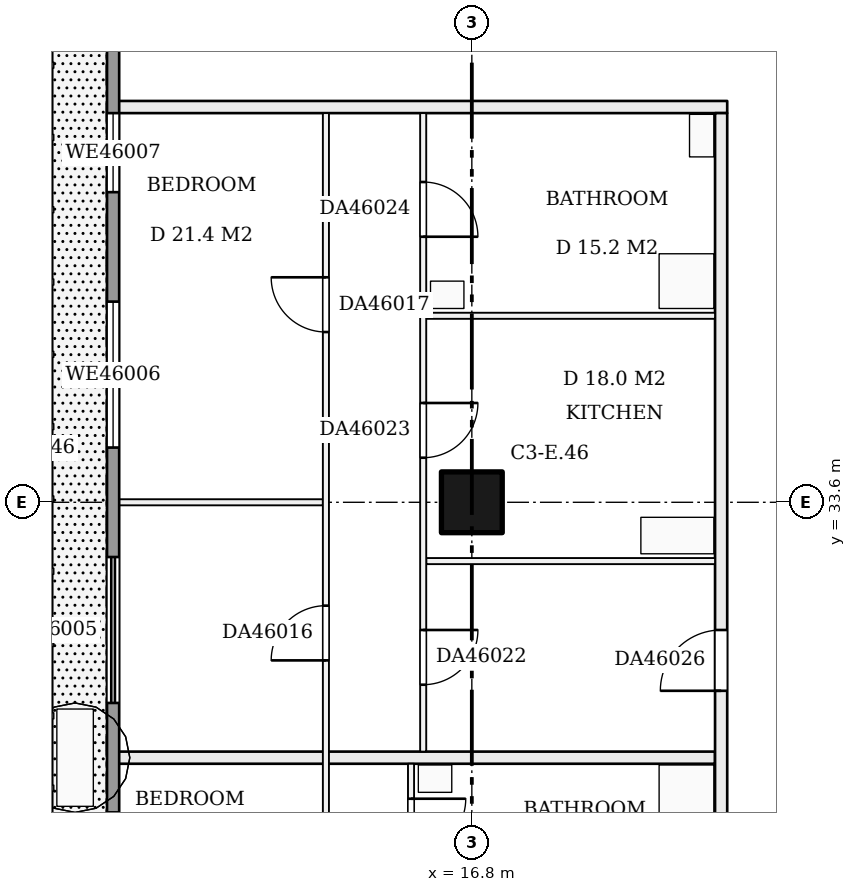
"""IFC4 building model, lengths in metres.
Left out: names, types, materials, properties, quantities, classifications, styles, units other than length and angle.
Written with IfcOpenShell. Run it as: python <this file> out.ifc"""

import sys

from ifc_helpers import new_model, si_unit, direction, frame, frame_2d, origin, origin_2d, place, context, subcontext, project, spatial, rectangle, extrude, element, fill, save


model = new_model("IFC4")
c1 = context("Model", 3, precision=1e-05, world=origin(), true_north=direction((0.0, 1.0)))
c2 = subcontext(c1, "Body", "Model", "MODEL_VIEW")
j1 = project(units=[si_unit("LENGTHUNIT", "METRE"), si_unit("PLANEANGLEUNIT", "RADIAN")], contexts=[c1])
p1 = place(None, origin())
s1 = spatial("IfcSite", under=j1, at=p1, CompositionType="ELEMENT")
p2 = place(p1, origin())
s2 = spatial("IfcBuilding", under=s1, at=p2, CompositionType="ELEMENT")
p3 = place(p2, frame((0.0, 0.0, 179.2)))
s3 = spatial("IfcBuildingStorey", under=s2, at=p3, CompositionType="ELEMENT", Elevation=179.2)
p4 = place(p3, frame((16.8, 33.6, 0.0), z_axis=(0.0, 0.0, 1.0), x_axis=(1.0, 0.0, 0.0)))
e1 = element("IfcColumn", 1, at=p4, inside=s3, PredefinedType="COLUMN", context=c2, shape_type="SweptSolid", body=[
    extrude(rectangle(XDim=1.0, YDim=1.0, at=origin_2d()), origin(), (0.0, 0.0, 1.0), 3.22),
])
p5 = place(p3, frame((10.9, 29.4, 0.0), z_axis=(0.0, 0.0, 1.0), x_axis=(1.0, 0.0, 0.0)))
e2 = element("IfcWall", 2, at=p5, inside=s3, PredefinedType="PARTITIONING", context=c2, shape_type="SweptSolid", body=[
    extrude(rectangle(XDim=9.9, YDim=0.2, at=frame_2d((4.95, 0.0))), origin(), (0.0, 0.0, 1.0), 3.22),
])
p6 = place(p3, frame((16.05, 32.633, 0.0), z_axis=(0.0, 0.0, 1.0), x_axis=(1.0, 0.0, 0.0)))
e3 = element("IfcWall", 3, at=p6, inside=s3, PredefinedType="PARTITIONING", context=c2, shape_type="SweptSolid", body=[
    extrude(rectangle(XDim=4.75, YDim=0.1, at=frame_2d((2.375, 0.0))), origin(), (0.0, 0.0, 1.0), 3.22),
])
p7 = place(p3, frame((10.9, 33.6, 0.0), z_axis=(0.0, 0.0, 1.0), x_axis=(1.0, 0.0, 0.0)))
e4 = element("IfcWall", 4, at=p7, inside=s3, PredefinedType="PARTITIONING", context=c2, shape_type="SweptSolid", body=[
    extrude(rectangle(XDim=3.45, YDim=0.1, at=frame_2d((1.725, 0.0))), origin(), (0.0, 0.0, 1.0), 3.22),
])
p8 = place(p3, frame((16.05, 36.667, 0.0), z_axis=(0.0, 0.0, 1.0), x_axis=(1.0, 0.0, 0.0)))
e5 = element("IfcWall", 5, at=p8, inside=s3, PredefinedType="PARTITIONING", context=c2, shape_type="SweptSolid", body=[
    extrude(rectangle(XDim=4.75, YDim=0.1, at=frame_2d((2.375, 0.0))), origin(), (0.0, 0.0, 1.0), 3.22),
])
p9 = place(p3, frame((10.9, 40.1, 0.0), z_axis=(0.0, 0.0, 1.0), x_axis=(1.0, 0.0, 0.0)))
e6 = element("IfcWall", 6, at=p9, inside=s3, PredefinedType="PARTITIONING", context=c2, shape_type="SweptSolid", body=[
    extrude(rectangle(XDim=10.1, YDim=0.2, at=frame_2d((5.05, 0.0))), origin(), (0.0, 0.0, 1.0), 3.22),
])
p10 = place(p3, frame((14.4, 21.0, 0.0), z_axis=(0.0, 0.0, 1.0), x_axis=(0.0, 1.0, 0.0)))
e7 = element("IfcWall", 7, at=p10, inside=s3, PredefinedType="PARTITIONING", context=c2, shape_type="SweptSolid", body=[
    extrude(rectangle(XDim=19.0, YDim=0.1, at=frame_2d((9.5, 0.0))), origin(), (0.0, 0.0, 1.0), 3.22),
])
p11 = place(p10, frame((1.6, 0.0, 0.0)))
e8 = element("IfcOpeningElement", 8, at=p11, cuts=e7, PredefinedType="OPENING", context=c2, shape_type="SweptSolid", body=[
    extrude(rectangle(XDim=0.9, YDim=2.1, at=frame_2d((0.45, 1.05))), frame((0.0, 0.06, 0.0), z_axis=(0.0, -1.0, 0.0), x_axis=(1.0, 0.0, 0.0)), (0.0, 0.0, 1.0), 0.12),
])
p12 = place(p10, frame((5.8, 0.0, 0.0)))
e9 = element("IfcOpeningElement", 9, at=p12, cuts=e7, PredefinedType="OPENING", context=c2, shape_type="SweptSolid", body=[
    extrude(rectangle(XDim=0.9, YDim=2.1, at=frame_2d((0.45, 1.05))), frame((0.0, 0.06, 0.0), z_axis=(0.0, -1.0, 0.0), x_axis=(1.0, 0.0, 0.0)), (0.0, 0.0, 1.0), 0.12),
])
p13 = place(p10, frame((10.0, 0.0, 0.0)))
e10 = element("IfcOpeningElement", 10, at=p13, cuts=e7, PredefinedType="OPENING", context=c2, shape_type="SweptSolid", body=[
    extrude(rectangle(XDim=0.9, YDim=2.1, at=frame_2d((0.45, 1.05))), frame((0.0, 0.06, 0.0), z_axis=(0.0, -1.0, 0.0), x_axis=(1.0, 0.0, 0.0)), (0.0, 0.0, 1.0), 0.12),
])
p14 = place(p10, frame((15.4, 0.0, 0.0)))
e11 = element("IfcOpeningElement", 11, at=p14, cuts=e7, PredefinedType="OPENING", context=c2, shape_type="SweptSolid", body=[
    extrude(rectangle(XDim=0.9, YDim=2.1, at=frame_2d((0.45, 1.05))), frame((0.0, 0.06, 0.0), z_axis=(0.0, -1.0, 0.0), x_axis=(1.0, 0.0, 0.0)), (0.0, 0.0, 1.0), 0.12),
])
p15 = place(p3, frame((15.8, 21.0, 0.0), z_axis=(0.0, 0.0, 1.0), x_axis=(0.0, 1.0, 0.0)))
e12 = element("IfcWall", 12, at=p15, inside=s3, PredefinedType="PARTITIONING", context=c2, shape_type="SweptSolid", body=[
    extrude(rectangle(XDim=8.3, YDim=0.1, at=frame_2d((4.15, 0.0))), origin(), (0.0, 0.0, 1.0), 3.22),
])
p16 = place(p15, frame((2.2, 0.0, 0.0)))
e13 = element("IfcOpeningElement", 13, at=p16, cuts=e12, PredefinedType="OPENING", context=c2, shape_type="SweptSolid", body=[
    extrude(rectangle(XDim=0.9, YDim=2.1, at=frame_2d((0.45, 1.05))), frame((0.0, 0.06, 0.0), z_axis=(0.0, -1.0, 0.0), x_axis=(1.0, 0.0, 0.0)), (0.0, 0.0, 1.0), 0.12),
])
p17 = place(p15, frame((0.3, 0.0, 0.0)))
e14 = element("IfcOpeningElement", 14, at=p17, cuts=e12, PredefinedType="OPENING", context=c2, shape_type="SweptSolid", body=[
    extrude(rectangle(XDim=0.9, YDim=2.1, at=frame_2d((0.45, 1.05))), frame((0.0, 0.06, 0.0), z_axis=(0.0, -1.0, 0.0), x_axis=(1.0, 0.0, 0.0)), (0.0, 0.0, 1.0), 0.12),
])
p18 = place(p15, frame((4.863, 0.0, 0.0)))
e15 = element("IfcOpeningElement", 15, at=p18, cuts=e12, PredefinedType="OPENING", context=c2, shape_type="SweptSolid", body=[
    extrude(rectangle(XDim=0.9, YDim=2.1, at=frame_2d((0.45, 1.05))), frame((0.0, 0.06, 0.0), z_axis=(0.0, -1.0, 0.0), x_axis=(1.0, 0.0, 0.0)), (0.0, 0.0, 1.0), 0.12),
])
p19 = place(p15, frame((6.825, 0.0, 0.0)))
e16 = element("IfcOpeningElement", 16, at=p19, cuts=e12, PredefinedType="OPENING", context=c2, shape_type="SweptSolid", body=[
    extrude(rectangle(XDim=0.9, YDim=2.1, at=frame_2d((0.45, 1.05))), frame((0.0, 0.06, 0.0), z_axis=(0.0, -1.0, 0.0), x_axis=(1.0, 0.0, 0.0)), (0.0, 0.0, 1.0), 0.12),
])
p20 = place(p3, frame((16.0, 29.5, 0.0), z_axis=(0.0, 0.0, 1.0), x_axis=(0.0, 1.0, 0.0)))
e17 = element("IfcWall", 17, at=p20, inside=s3, PredefinedType="PARTITIONING", context=c2, shape_type="SweptSolid", body=[
    extrude(rectangle(XDim=10.5, YDim=0.1, at=frame_2d((5.25, 0.0))), origin(), (0.0, 0.0, 1.0), 3.22),
])
p21 = place(p20, frame((1.1, 0.0, 0.0)))
e18 = element("IfcOpeningElement", 18, at=p21, cuts=e17, PredefinedType="OPENING", context=c2, shape_type="SweptSolid", body=[
    extrude(rectangle(XDim=0.9, YDim=2.1, at=frame_2d((0.45, 1.05))), frame((0.0, 0.06, 0.0), z_axis=(0.0, -1.0, 0.0), x_axis=(1.0, 0.0, 0.0)), (0.0, 0.0, 1.0), 0.12),
])
p22 = place(p20, frame((4.833, 0.0, 0.0)))
e19 = element("IfcOpeningElement", 19, at=p22, cuts=e17, PredefinedType="OPENING", context=c2, shape_type="SweptSolid", body=[
    extrude(rectangle(XDim=0.9, YDim=2.1, at=frame_2d((0.45, 1.05))), frame((0.0, 0.06, 0.0), z_axis=(0.0, -1.0, 0.0), x_axis=(1.0, 0.0, 0.0)), (0.0, 0.0, 1.0), 0.12),
])
p23 = place(p20, frame((8.467, 0.0, 0.0)))
e20 = element("IfcOpeningElement", 20, at=p23, cuts=e17, PredefinedType="OPENING", context=c2, shape_type="SweptSolid", body=[
    extrude(rectangle(XDim=0.9, YDim=2.1, at=frame_2d((0.45, 1.05))), frame((0.0, 0.06, 0.0), z_axis=(0.0, -1.0, 0.0), x_axis=(1.0, 0.0, 0.0)), (0.0, 0.0, 1.0), 0.12),
])
p24 = place(p3, frame((20.9, 22.8, 0.0), z_axis=(0.0, 0.0, 1.0), x_axis=(0.0, 1.0, 0.0)))
e21 = element("IfcWall", 21, at=p24, inside=s3, PredefinedType="PARTITIONING", context=c2, shape_type="SweptSolid", body=[
    extrude(rectangle(XDim=17.2, YDim=0.2, at=frame_2d((8.6, 0.0))), origin(), (0.0, 0.0, 1.0), 3.22),
])
p25 = place(p24, frame((0.3, 0.0, 0.0)))
e22 = element("IfcOpeningElement", 22, at=p25, cuts=e21, PredefinedType="OPENING", context=c2, shape_type="SweptSolid", body=[
    extrude(rectangle(XDim=1.0, YDim=2.1, at=frame_2d((0.5, 1.05))), frame((0.0, 0.11, 0.0), z_axis=(0.0, -1.0, 0.0), x_axis=(1.0, 0.0, 0.0)), (0.0, 0.0, 1.0), 0.22),
])
p26 = place(p24, frame((7.7, 0.0, 0.0)))
e23 = element("IfcOpeningElement", 23, at=p26, cuts=e21, PredefinedType="OPENING", context=c2, shape_type="SweptSolid", body=[
    extrude(rectangle(XDim=1.0, YDim=2.1, at=frame_2d((0.5, 1.05))), frame((0.0, 0.11, 0.0), z_axis=(0.0, -1.0, 0.0), x_axis=(1.0, 0.0, 0.0)), (0.0, 0.0, 1.0), 0.22),
])
p27 = place(p3, frame((10.9, 42.0, 0.0), z_axis=(0.0, 0.0, 1.0), x_axis=(0.0, -1.0, 0.0)))
e24 = element("IfcWall", 24, at=p27, inside=s3, PredefinedType="SOLIDWALL", context=c2, shape_type="SweptSolid", body=[
    extrude(rectangle(XDim=28.6, YDim=0.2, at=frame_2d((14.3, 0.0))), origin(), (0.0, 0.0, 1.0), 3.22),
])
p28 = place(p27, frame((25.9, 0.0, 0.0)))
e25 = element("IfcOpeningElement", 25, at=p28, cuts=e24, PredefinedType="OPENING", context=c2, shape_type="SweptSolid", body=[
    extrude(rectangle(XDim=2.4, YDim=2.2, at=frame_2d((1.2, 1.1))), frame((0.0, 0.11, 0.0), z_axis=(0.0, -1.0, 0.0), x_axis=(1.0, 0.0, 0.0)), (0.0, 0.0, 1.0), 0.22),
])
p29 = place(p27, frame((21.9, 0.0, 0.0)))
e26 = element("IfcOpeningElement", 26, at=p29, cuts=e24, PredefinedType="OPENING", context=c2, shape_type="SweptSolid", body=[
    extrude(rectangle(XDim=2.4, YDim=2.2, at=frame_2d((1.2, 1.1))), frame((0.0, 0.11, 0.0), z_axis=(0.0, -1.0, 0.0), x_axis=(1.0, 0.0, 0.0)), (0.0, 0.0, 1.0), 0.22),
])
p30 = place(p27, frame((17.7, 0.0, 0.0)))
e27 = element("IfcOpeningElement", 27, at=p30, cuts=e24, PredefinedType="OPENING", context=c2, shape_type="SweptSolid", body=[
    extrude(rectangle(XDim=2.4, YDim=2.2, at=frame_2d((1.2, 1.1))), frame((0.0, 0.11, 0.0), z_axis=(0.0, -1.0, 0.0), x_axis=(1.0, 0.0, 0.0)), (0.0, 0.0, 1.0), 0.22),
])
p31 = place(p27, frame((13.5, 0.0, 0.9)))
e28 = element("IfcOpeningElement", 28, at=p31, cuts=e24, PredefinedType="OPENING", context=c2, shape_type="SweptSolid", body=[
    extrude(rectangle(XDim=2.4, YDim=1.5, at=frame_2d((1.2, 0.75))), frame((0.0, 0.11, 0.0), z_axis=(0.0, -1.0, 0.0), x_axis=(1.0, 0.0, 0.0)), (0.0, 0.0, 1.0), 0.22),
])
p32 = place(p27, frame((9.3, 0.0, 0.0)))
e29 = element("IfcOpeningElement", 29, at=p32, cuts=e24, PredefinedType="OPENING", context=c2, shape_type="SweptSolid", body=[
    extrude(rectangle(XDim=2.4, YDim=2.2, at=frame_2d((1.2, 1.1))), frame((0.0, 0.11, 0.0), z_axis=(0.0, -1.0, 0.0), x_axis=(1.0, 0.0, 0.0)), (0.0, 0.0, 1.0), 0.22),
])
p33 = place(p27, frame((5.1, 0.0, 0.9)))
e30 = element("IfcOpeningElement", 30, at=p33, cuts=e24, PredefinedType="OPENING", context=c2, shape_type="SweptSolid", body=[
    extrude(rectangle(XDim=2.4, YDim=1.5, at=frame_2d((1.2, 0.75))), frame((0.0, 0.11, 0.0), z_axis=(0.0, -1.0, 0.0), x_axis=(1.0, 0.0, 0.0)), (0.0, 0.0, 1.0), 0.22),
])
p34 = place(p27, frame((2.0, 0.0, 0.9)))
e31 = element("IfcOpeningElement", 31, at=p34, cuts=e24, PredefinedType="OPENING", context=c2, shape_type="SweptSolid", body=[
    extrude(rectangle(XDim=1.3, YDim=1.5, at=frame_2d((0.65, 0.75))), frame((0.0, 0.11, 0.0), z_axis=(0.0, -1.0, 0.0), x_axis=(1.0, 0.0, 0.0)), (0.0, 0.0, 1.0), 0.22),
])
p35 = place(p13, origin())
e32 = element("IfcDoor", 32, at=p35, inside=s3, OperationType="SINGLE_SWING_LEFT", PredefinedType="DOOR", context=c2, shape_type="SweptSolid", body=[
    extrude(rectangle(XDim=0.9, YDim=2.1, at=frame_2d((0.45, 1.05))), frame((0.0, 0.025, 0.0), z_axis=(0.0, -1.0, 0.0), x_axis=(1.0, 0.0, 0.0)), (0.0, 0.0, 1.0), 0.05),
])
fill(e10, e32)
p36 = place(p14, origin())
e33 = element("IfcDoor", 33, at=p36, inside=s3, OperationType="SINGLE_SWING_RIGHT", PredefinedType="DOOR", context=c2, shape_type="SweptSolid", body=[
    extrude(rectangle(XDim=0.9, YDim=2.1, at=frame_2d((0.45, 1.05))), frame((0.0, 0.025, 0.0), z_axis=(0.0, -1.0, 0.0), x_axis=(1.0, 0.0, 0.0)), (0.0, 0.0, 1.0), 0.05),
])
fill(e11, e33)
p37 = place(p19, frame((0.9, 0.0, 0.0), z_axis=(0.0, 0.0, 1.0), x_axis=(-1.0, 0.0, 0.0)))
e34 = element("IfcDoor", 34, at=p37, inside=s3, OperationType="SINGLE_SWING_LEFT", PredefinedType="DOOR", context=c2, shape_type="SweptSolid", body=[
    extrude(rectangle(XDim=0.9, YDim=2.1, at=frame_2d((0.45, 1.05))), frame((0.0, 0.025, 0.0), z_axis=(0.0, -1.0, 0.0), x_axis=(1.0, 0.0, 0.0)), (0.0, 0.0, 1.0), 0.05),
])
fill(e16, e34)
p38 = place(p21, frame((0.9, 0.0, 0.0), z_axis=(0.0, 0.0, 1.0), x_axis=(-1.0, 0.0, 0.0)))
e35 = element("IfcDoor", 35, at=p38, inside=s3, OperationType="SINGLE_SWING_LEFT", PredefinedType="DOOR", context=c2, shape_type="SweptSolid", body=[
    extrude(rectangle(XDim=0.9, YDim=2.1, at=frame_2d((0.45, 1.05))), frame((0.0, 0.025, 0.0), z_axis=(0.0, -1.0, 0.0), x_axis=(1.0, 0.0, 0.0)), (0.0, 0.0, 1.0), 0.05),
])
fill(e18, e35)
p39 = place(p22, frame((0.9, 0.0, 0.0), z_axis=(0.0, 0.0, 1.0), x_axis=(-1.0, 0.0, 0.0)))
e36 = element("IfcDoor", 36, at=p39, inside=s3, OperationType="SINGLE_SWING_LEFT", PredefinedType="DOOR", context=c2, shape_type="SweptSolid", body=[
    extrude(rectangle(XDim=0.9, YDim=2.1, at=frame_2d((0.45, 1.05))), frame((0.0, 0.025, 0.0), z_axis=(0.0, -1.0, 0.0), x_axis=(1.0, 0.0, 0.0)), (0.0, 0.0, 1.0), 0.05),
])
fill(e19, e36)
p40 = place(p23, frame((0.9, 0.0, 0.0), z_axis=(0.0, 0.0, 1.0), x_axis=(-1.0, 0.0, 0.0)))
e37 = element("IfcDoor", 37, at=p40, inside=s3, OperationType="SINGLE_SWING_RIGHT", PredefinedType="DOOR", context=c2, shape_type="SweptSolid", body=[
    extrude(rectangle(XDim=0.9, YDim=2.1, at=frame_2d((0.45, 1.05))), frame((0.0, 0.025, 0.0), z_axis=(0.0, -1.0, 0.0), x_axis=(1.0, 0.0, 0.0)), (0.0, 0.0, 1.0), 0.05),
])
fill(e20, e37)
p41 = place(p26, origin())
e38 = element("IfcDoor", 38, at=p41, inside=s3, OperationType="SINGLE_SWING_LEFT", PredefinedType="DOOR", context=c2, shape_type="SweptSolid", body=[
    extrude(rectangle(XDim=1.0, YDim=2.1, at=frame_2d((0.5, 1.05))), frame((0.0, 0.025, 0.0), z_axis=(0.0, -1.0, 0.0), x_axis=(1.0, 0.0, 0.0)), (0.0, 0.0, 1.0), 0.05),
])
fill(e23, e38)
p42 = place(p32, origin())
e39 = element("IfcDoor", 39, at=p42, inside=s3, OperationType="DOUBLE_DOOR_SLIDING", PredefinedType="DOOR", context=c2, shape_type="SweptSolid", body=[
    extrude(rectangle(XDim=2.4, YDim=2.2, at=frame_2d((1.2, 1.1))), frame((0.0, 0.025, 0.0), z_axis=(0.0, -1.0, 0.0), x_axis=(1.0, 0.0, 0.0)), (0.0, 0.0, 1.0), 0.05),
])
fill(e29, e39)
p43 = place(p33, origin())
e40 = element("IfcWindow", 40, at=p43, inside=s3, PartitioningType="SINGLE_PANEL", PredefinedType="WINDOW", context=c2, shape_type="SweptSolid", body=[
    extrude(rectangle(XDim=2.4, YDim=1.5, at=frame_2d((1.2, 0.75))), frame((0.0, 0.03, 0.0), z_axis=(0.0, -1.0, 0.0), x_axis=(1.0, 0.0, 0.0)), (0.0, 0.0, 1.0), 0.06),
])
fill(e30, e40)
p44 = place(p34, origin())
e41 = element("IfcWindow", 41, at=p44, inside=s3, PartitioningType="SINGLE_PANEL", PredefinedType="WINDOW", context=c2, shape_type="SweptSolid", body=[
    extrude(rectangle(XDim=1.3, YDim=1.5, at=frame_2d((0.65, 0.75))), frame((0.0, 0.03, 0.0), z_axis=(0.0, -1.0, 0.0), x_axis=(1.0, 0.0, 0.0)), (0.0, 0.0, 1.0), 0.06),
])
fill(e31, e41)
save(model, sys.argv[1])
